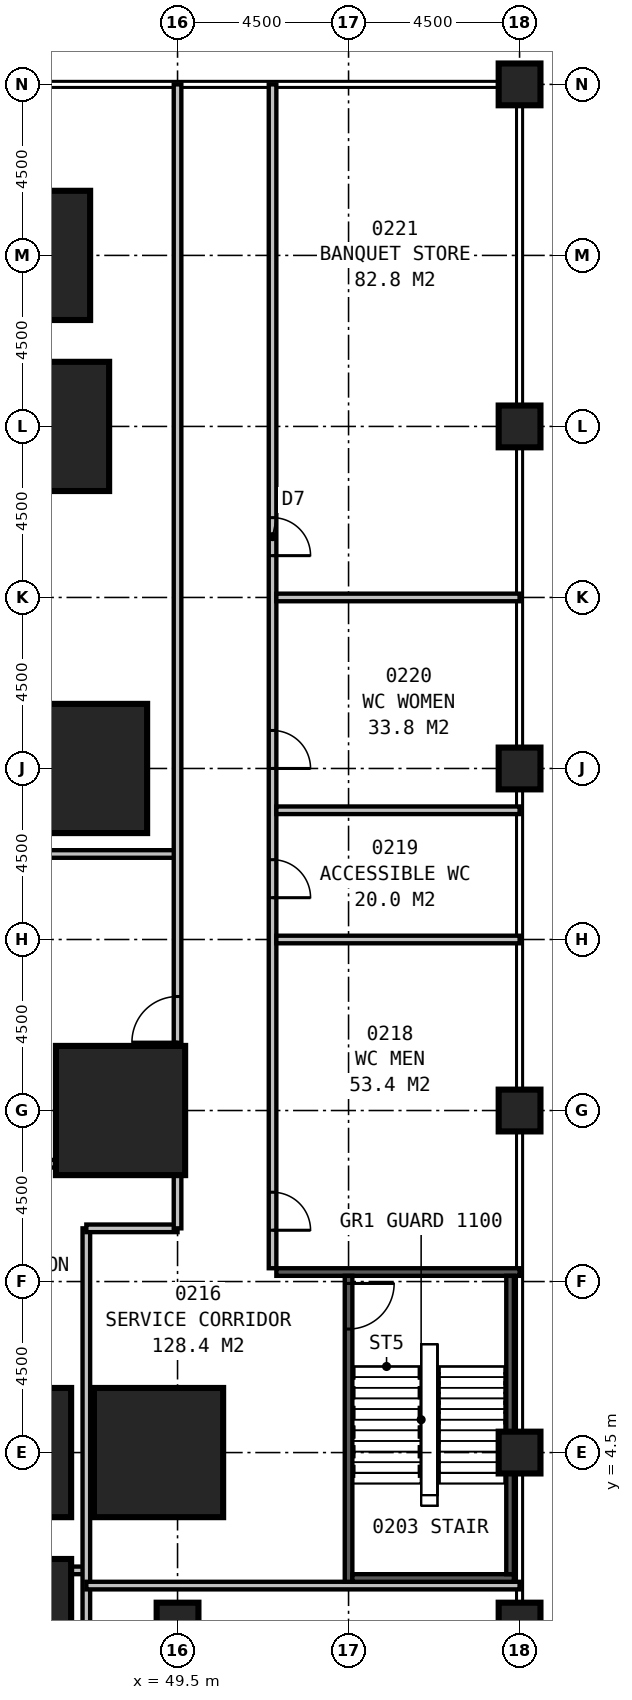
"""IFC4 building model, lengths in metres.
Left out: names, types, materials, properties, quantities, classifications, styles, units other than length and angle.
Written with IfcOpenShell. Run it as: python <this file> out.ifc"""

import sys

from ifc_helpers import new_model, si_unit, direction, frame, frame_2d, origin, origin_2d, place, context, subcontext, project, spatial, rectangle, extrude, element, fill, save


model = new_model("IFC4")
c1 = context("Model", 3, precision=1e-05, world=origin(), true_north=direction((0.0, 1.0)))
c2 = subcontext(c1, "Body", "Model", "MODEL_VIEW")
j1 = project(units=[si_unit("LENGTHUNIT", "METRE"), si_unit("PLANEANGLEUNIT", "RADIAN")], contexts=[c1])
p1 = place(None, origin())
s1 = spatial("IfcSite", under=j1, at=p1, CompositionType="ELEMENT")
p2 = place(p1, origin())
s2 = spatial("IfcBuilding", under=s1, at=p2, CompositionType="ELEMENT")
p3 = place(p2, frame((0.0, 0.0, 11.0)))
s3 = spatial("IfcBuildingStorey", under=s2, at=p3, CompositionType="ELEMENT", Elevation=11.0)
for number, where, z_axis, x_axis in (
    (1, (45.0, 0.0, 0.0), (0.0, 0.0, 1.0), (1.0, 0.0, 0.0)),
    (2, (45.0, 4.5, 0.0), (0.0, 0.0, 1.0), (1.0, 0.0, 0.0)),
    (3, (49.0, 4.5, 0.0), (0.0, 0.0, 1.0), (1.0, 0.0, 0.0)),
    (4, (48.0, 13.5, 0.0), (0.0, 0.0, 1.0), (1.0, 0.0, 0.0)),
    (5, (47.0, 22.5, 0.0), (0.0, 0.0, 1.0), (1.0, 0.0, 0.0)),
    (6, (46.0, 31.5, 0.0), (0.0, 0.0, 1.0), (1.0, 0.0, 0.0)),
    (7, (45.5, 36.0, 0.0), (0.0, 0.0, 1.0), (1.0, 0.0, 0.0)),
):
    element("IfcColumn", number, at=place(p3, frame(where, z_axis=z_axis, x_axis=x_axis)), inside=s3, PredefinedType="COLUMN", context=c2, shape_type="SweptSolid", body=[
        extrude(rectangle(XDim=3.4, YDim=3.4, at=origin_2d()), origin(), (0.0, 0.0, 1.0), 8.0),
    ])
for number, where, z_axis, x_axis in (
    (8, (58.5, 4.5, 0.0), (0.0, 0.0, 1.0), (1.0, 0.0, 0.0)),
    (9, (58.5, 13.5, 0.0), (0.0, 0.0, 1.0), (1.0, 0.0, 0.0)),
    (10, (58.5, 22.5, 0.0), (0.0, 0.0, 1.0), (1.0, 0.0, 0.0)),
    (11, (58.5, 31.5, 0.0), (0.0, 0.0, 1.0), (1.0, 0.0, 0.0)),
    (12, (58.5, 40.5, 0.0), (0.0, 0.0, 1.0), (1.0, 0.0, 0.0)),
    (13, (58.5, 0.0, 0.0), (0.0, 0.0, 1.0), (1.0, 0.0, 0.0)),
    (14, (49.5, 0.0, 0.0), (0.0, 0.0, 1.0), (1.0, 0.0, 0.0)),
):
    element("IfcColumn", number, at=place(p3, frame(where, z_axis=z_axis, x_axis=x_axis)), inside=s3, PredefinedType="COLUMN", context=c2, shape_type="SweptSolid", body=[
        extrude(rectangle(XDim=1.1, YDim=1.1, at=origin_2d()), origin(), (0.0, 0.0, 1.0), 8.0),
    ])
p4 = place(p3, frame((54.0, 1.1, 0.0), z_axis=(0.0, 0.0, 1.0), x_axis=(0.0, 1.0, 0.0)))
e15 = element("IfcWall", 15, at=p4, inside=s3, PredefinedType="SOLIDWALL", context=c2, shape_type="SweptSolid", body=[
    extrude(rectangle(XDim=8.05, YDim=0.2, at=frame_2d((4.025, 0.0))), origin(), (0.0, 0.0, 1.0), 7.7),
])
p5 = place(p4, frame((7.85, 0.0, 0.0), z_axis=(0.0, 0.0, 1.0), x_axis=(-1.0, 0.0, 0.0)))
e16 = element("IfcOpeningElement", 16, at=p5, cuts=e15, PredefinedType="OPENING", context=c2, shape_type="SweptSolid", body=[
    extrude(rectangle(XDim=1.2, YDim=2.1, at=frame_2d((0.6, 1.05))), frame((0.0, 0.11, 0.0), z_axis=(0.0, -1.0, 0.0), x_axis=(1.0, 0.0, 0.0)), (0.0, 0.0, 1.0), 0.22),
])
p6 = place(p3, frame((52.1, 9.25, 0.0), z_axis=(0.0, 0.0, 1.0), x_axis=(1.0, 0.0, 0.0)))
e17 = element("IfcWall", 17, at=p6, inside=s3, PredefinedType="SOLIDWALL", context=c2, shape_type="SweptSolid", body=[
    extrude(rectangle(XDim=6.4, YDim=0.2, at=frame_2d((3.2, 0.0))), origin(), (0.0, 0.0, 1.0), 7.7),
])
p7 = place(p3, frame((54.1, 1.2, 0.0), z_axis=(0.0, 0.0, 1.0), x_axis=(1.0, 0.0, 0.0)))
e18 = element("IfcWall", 18, at=p7, inside=s3, PredefinedType="SOLIDWALL", context=c2, shape_type="SweptSolid", body=[
    extrude(rectangle(XDim=4.25, YDim=0.2, at=frame_2d((2.125, 0.0))), origin(), (0.0, 0.0, 1.0), 7.7),
])
p8 = place(p3, frame((58.25, 1.3, 0.0), z_axis=(0.0, 0.0, 1.0), x_axis=(0.0, 1.0, 0.0)))
e19 = element("IfcWall", 19, at=p8, inside=s3, PredefinedType="SOLIDWALL", context=c2, shape_type="SweptSolid", body=[
    extrude(rectangle(XDim=2.65, YDim=0.2, at=frame_2d((1.325, 0.0))), origin(), (0.0, 0.0, 1.0), 7.7),
])
p9 = place(p3, frame((58.25, 5.05, 0.0), z_axis=(0.0, 0.0, 1.0), x_axis=(0.0, 1.0, 0.0)))
e20 = element("IfcWall", 20, at=p9, inside=s3, PredefinedType="SOLIDWALL", context=c2, shape_type="SweptSolid", body=[
    extrude(rectangle(XDim=4.1, YDim=0.2, at=frame_2d((2.05, 0.0))), origin(), (0.0, 0.0, 1.0), 7.7),
])
p10 = place(p3, frame((47.1, -0.65, 0.0), z_axis=(0.0, 0.0, 1.0), x_axis=(0.0, 1.0, 0.0)))
e21 = element("IfcWall", 21, at=p10, inside=s3, PredefinedType="PARTITIONING", context=c2, shape_type="SweptSolid", body=[
    extrude(rectangle(XDim=11.05, YDim=0.2, at=frame_2d((5.525, 0.0))), origin(), (0.0, 0.0, 1.0), 7.7),
])
p11 = place(p3, frame((47.1, 10.4, 0.0), z_axis=(0.0, 0.0, 1.0), x_axis=(1.0, 0.0, 0.0)))
e22 = element("IfcWall", 22, at=p11, inside=s3, PredefinedType="PARTITIONING", context=c2, shape_type="SweptSolid", body=[
    extrude(rectangle(XDim=2.4, YDim=0.2, at=frame_2d((1.2, 0.0))), origin(), (0.0, 0.0, 1.0), 7.7),
])
p12 = place(p3, frame((49.5, 10.4, 0.0), z_axis=(0.0, 0.0, 1.0), x_axis=(0.0, 1.0, 0.0)))
e23 = element("IfcWall", 23, at=p12, inside=s3, PredefinedType="PARTITIONING", context=c2, shape_type="SweptSolid", body=[
    extrude(rectangle(XDim=30.1, YDim=0.2, at=frame_2d((15.05, 0.0))), origin(), (0.0, 0.0, 1.0), 7.7),
])
p13 = place(p12, frame((4.9, 0.0, 0.0)))
e24 = element("IfcOpeningElement", 24, at=p13, cuts=e23, PredefinedType="OPENING", context=c2, shape_type="SweptSolid", body=[
    extrude(rectangle(XDim=1.2, YDim=2.1, at=frame_2d((0.6, 1.05))), frame((0.0, 0.11, 0.0), z_axis=(0.0, -1.0, 0.0), x_axis=(1.0, 0.0, 0.0)), (0.0, 0.0, 1.0), 0.22),
])
p14 = place(p3, frame((40.5, 12.1, 0.0), z_axis=(0.0, 0.0, 1.0), x_axis=(1.0, 0.0, 0.0)))
e25 = element("IfcWall", 25, at=p14, inside=s3, PredefinedType="PARTITIONING", context=c2, shape_type="SweptSolid", body=[
    extrude(rectangle(XDim=9.0, YDim=0.2, at=frame_2d((4.5, 0.0))), origin(), (0.0, 0.0, 1.0), 7.7),
])
p15 = place(p3, frame((40.5, 1.4, 0.0), z_axis=(0.0, 0.0, 1.0), x_axis=(1.0, 0.0, 0.0)))
e26 = element("IfcWall", 26, at=p15, inside=s3, PredefinedType="PARTITIONING", context=c2, shape_type="SweptSolid", body=[
    extrude(rectangle(XDim=6.6, YDim=0.2, at=frame_2d((3.3, 0.0))), origin(), (0.0, 0.0, 1.0), 6.8),
])
p16 = place(p3, frame((36.3, 20.25, 0.0), z_axis=(0.0, 0.0, 1.0), x_axis=(1.0, 0.0, 0.0)))
e27 = element("IfcWall", 27, at=p16, inside=s3, PredefinedType="PARTITIONING", context=c2, shape_type="SweptSolid", body=[
    extrude(rectangle(XDim=13.2, YDim=0.2, at=frame_2d((6.6, 0.0))), origin(), (0.0, 0.0, 1.0), 7.7),
])
p17 = place(p16, frame((4.0, 0.0, 0.0)))
e28 = element("IfcOpeningElement", 28, at=p17, cuts=e27, PredefinedType="OPENING", context=c2, shape_type="SweptSolid", body=[
    extrude(rectangle(XDim=1.8, YDim=2.4, at=frame_2d((0.9, 1.2))), frame((0.0, 0.11, 0.0), z_axis=(0.0, -1.0, 0.0), x_axis=(1.0, 0.0, 0.0)), (0.0, 0.0, 1.0), 0.22),
])
p18 = place(p3, frame((52.0, 9.35, 0.0), z_axis=(0.0, 0.0, 1.0), x_axis=(0.0, 1.0, 0.0)))
e29 = element("IfcWall", 29, at=p18, inside=s3, PredefinedType="PARTITIONING", context=c2, shape_type="SweptSolid", body=[
    extrude(rectangle(XDim=31.15, YDim=0.2, at=frame_2d((15.575, 0.0))), origin(), (0.0, 0.0, 1.0), 7.7),
])
p19 = place(p18, frame((2.0, 0.0, 0.0), z_axis=(0.0, 0.0, 1.0), x_axis=(-1.0, 0.0, 0.0)))
e30 = element("IfcOpeningElement", 30, at=p19, cuts=e29, PredefinedType="OPENING", context=c2, shape_type="SweptSolid", body=[
    extrude(rectangle(XDim=1.0, YDim=2.1, at=frame_2d((0.5, 1.05))), frame((0.0, 0.11, 0.0), z_axis=(0.0, -1.0, 0.0), x_axis=(1.0, 0.0, 0.0)), (0.0, 0.0, 1.0), 0.22),
])
p20 = place(p18, frame((10.75, 0.0, 0.0), z_axis=(0.0, 0.0, 1.0), x_axis=(-1.0, 0.0, 0.0)))
e31 = element("IfcOpeningElement", 31, at=p20, cuts=e29, PredefinedType="OPENING", context=c2, shape_type="SweptSolid", body=[
    extrude(rectangle(XDim=1.0, YDim=2.1, at=frame_2d((0.5, 1.05))), frame((0.0, 0.11, 0.0), z_axis=(0.0, -1.0, 0.0), x_axis=(1.0, 0.0, 0.0)), (0.0, 0.0, 1.0), 0.22),
])
p21 = place(p18, frame((14.15, 0.0, 0.0), z_axis=(0.0, 0.0, 1.0), x_axis=(-1.0, 0.0, 0.0)))
e32 = element("IfcOpeningElement", 32, at=p21, cuts=e29, PredefinedType="OPENING", context=c2, shape_type="SweptSolid", body=[
    extrude(rectangle(XDim=1.0, YDim=2.1, at=frame_2d((0.5, 1.05))), frame((0.0, 0.11, 0.0), z_axis=(0.0, -1.0, 0.0), x_axis=(1.0, 0.0, 0.0)), (0.0, 0.0, 1.0), 0.22),
])
p22 = place(p18, frame((19.75, 0.0, 0.0), z_axis=(0.0, 0.0, 1.0), x_axis=(-1.0, 0.0, 0.0)))
e33 = element("IfcOpeningElement", 33, at=p22, cuts=e29, PredefinedType="OPENING", context=c2, shape_type="SweptSolid", body=[
    extrude(rectangle(XDim=1.0, YDim=2.1, at=frame_2d((0.5, 1.05))), frame((0.0, 0.11, 0.0), z_axis=(0.0, -1.0, 0.0), x_axis=(1.0, 0.0, 0.0)), (0.0, 0.0, 1.0), 0.22),
])
p23 = place(p3, frame((47.1, 1.0, 0.0), z_axis=(0.0, 0.0, 1.0), x_axis=(1.0, 0.0, 0.0)))
e34 = element("IfcWall", 34, at=p23, inside=s3, PredefinedType="PARTITIONING", context=c2, shape_type="SweptSolid", body=[
    extrude(rectangle(XDim=11.4, YDim=0.2, at=frame_2d((5.7, 0.0))), origin(), (0.0, 0.0, 1.0), 6.8),
])
for number, where, z_axis, x_axis in (
    (35, (52.1, 18.0, 0.0), (0.0, 0.0, 1.0), (1.0, 0.0, 0.0)),
    (36, (52.1, 21.4, 0.0), (0.0, 0.0, 1.0), (1.0, 0.0, 0.0)),
    (37, (52.1, 27.0, 0.0), (0.0, 0.0, 1.0), (1.0, 0.0, 0.0)),
):
    element("IfcWall", number, at=place(p3, frame(where, z_axis=z_axis, x_axis=x_axis)), inside=s3, PredefinedType="PARTITIONING", context=c2, shape_type="SweptSolid", body=[
        extrude(rectangle(XDim=6.4, YDim=0.2, at=frame_2d((3.2, 0.0))), origin(), (0.0, 0.0, 1.0), 7.7),
    ])
p24 = place(p5, origin())
e38 = element("IfcDoor", 38, at=p24, inside=s3, OperationType="SINGLE_SWING_LEFT", PredefinedType="DOOR", context=c2, shape_type="SweptSolid", body=[
    extrude(rectangle(XDim=1.2, YDim=2.1, at=frame_2d((0.6, 1.05))), frame((0.0, 0.025, 0.0), z_axis=(0.0, -1.0, 0.0), x_axis=(1.0, 0.0, 0.0)), (0.0, 0.0, 1.0), 0.05),
])
fill(e16, e38)
p25 = place(p13, origin())
e39 = element("IfcDoor", 39, at=p25, inside=s3, OperationType="SINGLE_SWING_LEFT", PredefinedType="DOOR", context=c2, shape_type="SweptSolid", body=[
    extrude(rectangle(XDim=1.2, YDim=2.1, at=frame_2d((0.6, 1.05))), frame((0.0, 0.025, 0.0), z_axis=(0.0, -1.0, 0.0), x_axis=(1.0, 0.0, 0.0)), (0.0, 0.0, 1.0), 0.05),
])
fill(e24, e39)
p26 = place(p19, origin())
e40 = element("IfcDoor", 40, at=p26, inside=s3, OperationType="SINGLE_SWING_RIGHT", PredefinedType="DOOR", context=c2, shape_type="SweptSolid", body=[
    extrude(rectangle(XDim=1.0, YDim=2.1, at=frame_2d((0.5, 1.05))), frame((0.0, 0.025, 0.0), z_axis=(0.0, -1.0, 0.0), x_axis=(1.0, 0.0, 0.0)), (0.0, 0.0, 1.0), 0.05),
])
fill(e30, e40)
p27 = place(p20, origin())
e41 = element("IfcDoor", 41, at=p27, inside=s3, OperationType="SINGLE_SWING_RIGHT", PredefinedType="DOOR", context=c2, shape_type="SweptSolid", body=[
    extrude(rectangle(XDim=1.0, YDim=2.1, at=frame_2d((0.5, 1.05))), frame((0.0, 0.025, 0.0), z_axis=(0.0, -1.0, 0.0), x_axis=(1.0, 0.0, 0.0)), (0.0, 0.0, 1.0), 0.05),
])
fill(e31, e41)
p28 = place(p21, origin())
e42 = element("IfcDoor", 42, at=p28, inside=s3, OperationType="SINGLE_SWING_RIGHT", PredefinedType="DOOR", context=c2, shape_type="SweptSolid", body=[
    extrude(rectangle(XDim=1.0, YDim=2.1, at=frame_2d((0.5, 1.05))), frame((0.0, 0.025, 0.0), z_axis=(0.0, -1.0, 0.0), x_axis=(1.0, 0.0, 0.0)), (0.0, 0.0, 1.0), 0.05),
])
fill(e32, e42)
p29 = place(p22, origin())
e43 = element("IfcDoor", 43, at=p29, inside=s3, OperationType="SINGLE_SWING_RIGHT", PredefinedType="DOOR", context=c2, shape_type="SweptSolid", body=[
    extrude(rectangle(XDim=1.0, YDim=2.1, at=frame_2d((0.5, 1.05))), frame((0.0, 0.025, 0.0), z_axis=(0.0, -1.0, 0.0), x_axis=(1.0, 0.0, 0.0)), (0.0, 0.0, 1.0), 0.05),
])
fill(e33, e43)
save(model, sys.argv[1])
